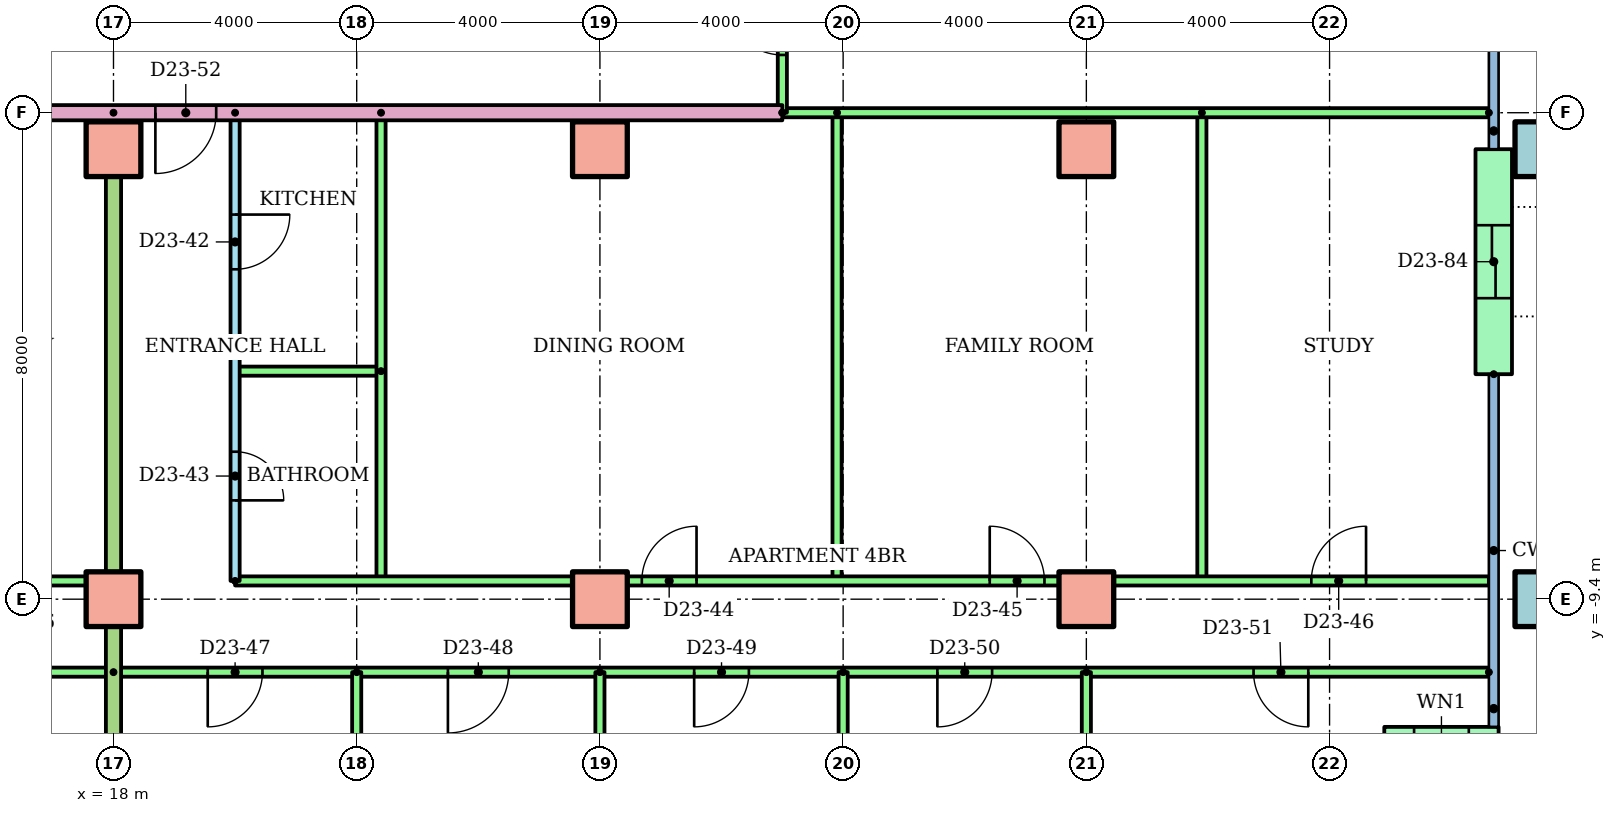
"""IFC4 building model, lengths in metres.
Left out: names, types, materials, properties, quantities, classifications, styles, units other than length and angle.
Written with IfcOpenShell. Run it as: python <this file> out.ifc"""

import sys

from ifc_helpers import new_model, si_unit, direction, frame, frame_2d, origin, origin_2d, place, context, subcontext, project, spatial, rectangle, hollow_rectangle, extrude, element, fill, save


model = new_model("IFC4")
c1 = context("Model", 3, precision=1e-05, world=origin(), true_north=direction((0.0, 1.0)))
c2 = subcontext(c1, "Body", "Model", "MODEL_VIEW")
j1 = project(units=[si_unit("LENGTHUNIT", "METRE"), si_unit("PLANEANGLEUNIT", "RADIAN")], contexts=[c1])
p1 = place(None, origin())
s1 = spatial("IfcSite", under=j1, at=p1, CompositionType="ELEMENT")
p2 = place(p1, origin())
s2 = spatial("IfcBuilding", under=s1, at=p2, CompositionType="ELEMENT")
p3 = place(p2, frame((0.0, 0.0, 90.3)))
s3 = spatial("IfcBuildingStorey", under=s2, at=p3, CompositionType="ELEMENT", Elevation=90.3)
for number, where in (
    (1, (18.0, -9.4, 0.0)),
    (2, (26.0, -9.4, 0.0)),
    (3, (34.0, -9.4, 0.0)),
):
    element("IfcColumn", number, at=place(p3, frame(where)), inside=s3, PredefinedType="COLUMN", context=c2, shape_type="SweptSolid", body=[
        extrude(rectangle(XDim=0.9, YDim=0.9, at=origin_2d()), origin(), (0.0, 0.0, 1.0), 3.2),
    ])
p4 = place(p3, frame((41.5, -9.4, 0.0)))
e4 = element("IfcColumn", 4, at=p4, inside=s3, PredefinedType="COLUMN", context=c2, shape_type="SweptSolid", body=[
    extrude(hollow_rectangle(XDim=0.9, YDim=0.9, WallThickness=0.045, at=origin_2d()), origin(), (0.0, 0.0, 1.0), 3.2),
])
for number, where in (
    (5, (18.0, -2.0, 0.0)),
    (6, (26.0, -2.0, 0.0)),
    (7, (34.0, -2.0, 0.0)),
):
    element("IfcColumn", number, at=place(p3, frame(where)), inside=s3, PredefinedType="COLUMN", context=c2, shape_type="SweptSolid", body=[
        extrude(rectangle(XDim=0.9, YDim=0.9, at=origin_2d()), origin(), (0.0, 0.0, 1.0), 3.2),
    ])
p5 = place(p3, frame((41.5, -2.0, 0.0)))
e8 = element("IfcColumn", 8, at=p5, inside=s3, PredefinedType="COLUMN", context=c2, shape_type="SweptSolid", body=[
    extrude(hollow_rectangle(XDim=0.9, YDim=0.9, WallThickness=0.045, at=origin_2d()), origin(), (0.0, 0.0, 1.0), 3.2),
])
p6 = place(p3, frame((38.9, -11.8, 0.0)))
e9 = element("IfcWall", 9, at=p6, inside=s3, PredefinedType="STANDARD", context=c2, shape_type="SweptSolid", body=[
    extrude(rectangle(XDim=1.88, YDim=0.6, at=frame_2d((0.94, 0.0))), origin(), (0.0, 0.0, 1.0), 2.92),
])
p7 = place(p6, frame((0.49, 0.0, 0.9)))
e10 = element("IfcOpeningElement", 10, at=p7, cuts=e9, PredefinedType="OPENING", context=c2, shape_type="SweptSolid", body=[
    extrude(rectangle(XDim=0.9, YDim=1.5, at=frame_2d((0.45, 0.75))), frame((0.0, 0.31, 0.0), z_axis=(0.0, -1.0, 0.0), x_axis=(1.0, 0.0, 0.0)), (0.0, 0.0, 1.0), 0.62),
])
p8 = place(p3, frame((40.7, -5.7, 0.0), z_axis=(0.0, 0.0, 1.0), x_axis=(0.0, 1.0, 0.0)))
e11 = element("IfcWall", 11, at=p8, inside=s3, PredefinedType="STANDARD", context=c2, shape_type="SweptSolid", body=[
    extrude(rectangle(XDim=3.7, YDim=0.6, at=frame_2d((1.85, 0.0))), origin(), (0.0, 0.0, 1.0), 2.92),
])
p9 = place(p8, frame((1.25, 0.0, 0.0)))
e12 = element("IfcOpeningElement", 12, at=p9, cuts=e11, PredefinedType="OPENING", context=c2, shape_type="SweptSolid", body=[
    extrude(rectangle(XDim=1.2, YDim=2.1, at=frame_2d((0.6, 1.05))), frame((0.0, 0.31, 0.0), z_axis=(0.0, -1.0, 0.0), x_axis=(1.0, 0.0, 0.0)), (0.0, 0.0, 1.0), 0.62),
])
p10 = place(p3, frame((4.0, -9.1, 0.0)))
e13 = element("IfcWall", 13, at=p10, inside=s3, PredefinedType="PARTITIONING", context=c2, shape_type="SweptSolid", body=[
    extrude(rectangle(XDim=14.0, YDim=0.15, at=frame_2d((7.0, 0.0))), origin(), (0.0, 0.0, 1.0), 2.4),
])
p11 = place(p10, frame((4.325, 0.0, 0.0)))
e14 = element("IfcOpeningElement", 14, at=p11, cuts=e13, PredefinedType="OPENING", context=c2, shape_type="SweptSolid", body=[
    extrude(rectangle(XDim=0.9, YDim=2.1, at=frame_2d((0.45, 1.05))), frame((0.0, 0.085, 0.0), z_axis=(0.0, -1.0, 0.0), x_axis=(1.0, 0.0, 0.0)), (0.0, 0.0, 1.0), 0.17),
])
p12 = place(p10, frame((8.575, 0.0, 0.0)))
e15 = element("IfcOpeningElement", 15, at=p12, cuts=e13, PredefinedType="OPENING", context=c2, shape_type="SweptSolid", body=[
    extrude(rectangle(XDim=0.9, YDim=2.1, at=frame_2d((0.45, 1.05))), frame((0.0, 0.085, 0.0), z_axis=(0.0, -1.0, 0.0), x_axis=(1.0, 0.0, 0.0)), (0.0, 0.0, 1.0), 0.17),
])
p13 = place(p10, frame((12.0, 0.0, 0.0)))
e16 = element("IfcOpeningElement", 16, at=p13, cuts=e13, PredefinedType="OPENING", context=c2, shape_type="SweptSolid", body=[
    extrude(rectangle(XDim=0.9, YDim=2.1, at=frame_2d((0.45, 1.05))), frame((0.0, 0.085, 0.0), z_axis=(0.0, -1.0, 0.0), x_axis=(1.0, 0.0, 0.0)), (0.0, 0.0, 1.0), 0.17),
])
p14 = place(p3, frame((18.0, -10.6, 0.0), z_axis=(0.0, 0.0, 1.0), x_axis=(-1.0, 0.0, 0.0)))
e17 = element("IfcWall", 17, at=p14, inside=s3, PredefinedType="PARTITIONING", context=c2, shape_type="SweptSolid", body=[
    extrude(rectangle(XDim=16.0, YDim=0.15, at=frame_2d((8.0, 0.0))), origin(), (0.0, 0.0, 1.0), 2.4),
])
p15 = place(p14, frame((13.55, 0.0, 0.0)))
e18 = element("IfcOpeningElement", 18, at=p15, cuts=e17, PredefinedType="OPENING", context=c2, shape_type="SweptSolid", body=[
    extrude(rectangle(XDim=0.9, YDim=2.1, at=frame_2d((0.45, 1.05))), frame((0.0, 0.085, 0.0), z_axis=(0.0, -1.0, 0.0), x_axis=(1.0, 0.0, 0.0)), (0.0, 0.0, 1.0), 0.17),
])
p16 = place(p14, frame((9.55, 0.0, 0.0)))
e19 = element("IfcOpeningElement", 19, at=p16, cuts=e17, PredefinedType="OPENING", context=c2, shape_type="SweptSolid", body=[
    extrude(rectangle(XDim=0.9, YDim=2.1, at=frame_2d((0.45, 1.05))), frame((0.0, 0.085, 0.0), z_axis=(0.0, -1.0, 0.0), x_axis=(1.0, 0.0, 0.0)), (0.0, 0.0, 1.0), 0.17),
])
p17 = place(p14, frame((5.55, 0.0, 0.0)))
e20 = element("IfcOpeningElement", 20, at=p17, cuts=e17, PredefinedType="OPENING", context=c2, shape_type="SweptSolid", body=[
    extrude(rectangle(XDim=0.9, YDim=2.1, at=frame_2d((0.45, 1.05))), frame((0.0, 0.085, 0.0), z_axis=(0.0, -1.0, 0.0), x_axis=(1.0, 0.0, 0.0)), (0.0, 0.0, 1.0), 0.17),
])
p18 = place(p14, frame((1.5, 0.0, 0.0)))
e21 = element("IfcOpeningElement", 21, at=p18, cuts=e17, PredefinedType="OPENING", context=c2, shape_type="SweptSolid", body=[
    extrude(rectangle(XDim=1.0, YDim=2.1, at=frame_2d((0.5, 1.05))), frame((0.0, 0.085, 0.0), z_axis=(0.0, -1.0, 0.0), x_axis=(1.0, 0.0, 0.0)), (0.0, 0.0, 1.0), 0.17),
])
p19 = place(p3, frame((20.0, -1.4, 0.0), z_axis=(0.0, 0.0, 1.0), x_axis=(0.0, -1.0, 0.0)))
e22 = element("IfcWall", 22, at=p19, inside=s3, PredefinedType="PARTITIONING", context=c2, shape_type="SweptSolid", body=[
    extrude(rectangle(XDim=7.7, YDim=0.15, at=frame_2d((3.85, 0.0))), origin(), (0.0, 0.0, 1.0), 2.4),
])
p20 = place(p19, frame((1.675, 0.0, 0.0)))
e23 = element("IfcOpeningElement", 23, at=p20, cuts=e22, PredefinedType="OPENING", context=c2, shape_type="SweptSolid", body=[
    extrude(rectangle(XDim=0.9, YDim=2.1, at=frame_2d((0.45, 1.05))), frame((0.0, 0.085, 0.0), z_axis=(0.0, -1.0, 0.0), x_axis=(1.0, 0.0, 0.0)), (0.0, 0.0, 1.0), 0.17),
])
p21 = place(p19, frame((5.575, 0.0, 0.0)))
e24 = element("IfcOpeningElement", 24, at=p21, cuts=e22, PredefinedType="OPENING", context=c2, shape_type="SweptSolid", body=[
    extrude(rectangle(XDim=0.8, YDim=2.1, at=frame_2d((0.4, 1.05))), frame((0.0, 0.085, 0.0), z_axis=(0.0, -1.0, 0.0), x_axis=(1.0, 0.0, 0.0)), (0.0, 0.0, 1.0), 0.17),
])
p22 = place(p3, frame((22.4, -5.65, 0.0), z_axis=(0.0, 0.0, 1.0), x_axis=(-1.0, 0.0, 0.0)))
e25 = element("IfcWall", 25, at=p22, inside=s3, PredefinedType="PARTITIONING", context=c2, shape_type="SweptSolid", body=[
    extrude(rectangle(XDim=2.4, YDim=0.15, at=frame_2d((1.2, 0.0))), origin(), (0.0, 0.0, 1.0), 2.4),
])
for number, where, z_axis, x_axis in (
    (26, (22.4, -1.4, 0.0), (0.0, 0.0, 1.0), (0.0, -1.0, 0.0)),
    (27, (29.9, -1.4, 0.0), (0.0, 0.0, 1.0), (0.0, -1.0, 0.0)),
    (28, (35.9, -1.4, 0.0), (0.0, 0.0, 1.0), (0.0, -1.0, 0.0)),
):
    element("IfcWall", number, at=place(p3, frame(where, z_axis=z_axis, x_axis=x_axis)), inside=s3, PredefinedType="PARTITIONING", context=c2, shape_type="SweptSolid", body=[
        extrude(rectangle(XDim=7.7, YDim=0.15, at=frame_2d((3.85, 0.0))), origin(), (0.0, 0.0, 1.0), 2.4),
    ])
p23 = place(p3, frame((20.0, -9.1, 0.0)))
e29 = element("IfcWall", 29, at=p23, inside=s3, PredefinedType="PARTITIONING", context=c2, shape_type="SweptSolid", body=[
    extrude(rectangle(XDim=20.62, YDim=0.15, at=frame_2d((10.31, 0.0))), origin(), (0.0, 0.0, 1.0), 2.4),
])
p24 = place(p23, frame((6.689, 0.0, 0.0)))
e30 = element("IfcOpeningElement", 30, at=p24, cuts=e29, PredefinedType="OPENING", context=c2, shape_type="SweptSolid", body=[
    extrude(rectangle(XDim=0.9, YDim=2.1, at=frame_2d((0.45, 1.05))), frame((0.0, 0.085, 0.0), z_axis=(0.0, -1.0, 0.0), x_axis=(1.0, 0.0, 0.0)), (0.0, 0.0, 1.0), 0.17),
])
p25 = place(p23, frame((12.411, 0.0, 0.0)))
e31 = element("IfcOpeningElement", 31, at=p25, cuts=e29, PredefinedType="OPENING", context=c2, shape_type="SweptSolid", body=[
    extrude(rectangle(XDim=0.9, YDim=2.1, at=frame_2d((0.45, 1.05))), frame((0.0, 0.085, 0.0), z_axis=(0.0, -1.0, 0.0), x_axis=(1.0, 0.0, 0.0)), (0.0, 0.0, 1.0), 0.17),
])
p26 = place(p23, frame((17.7, 0.0, 0.0)))
e32 = element("IfcOpeningElement", 32, at=p26, cuts=e29, PredefinedType="OPENING", context=c2, shape_type="SweptSolid", body=[
    extrude(rectangle(XDim=0.9, YDim=2.1, at=frame_2d((0.45, 1.05))), frame((0.0, 0.085, 0.0), z_axis=(0.0, -1.0, 0.0), x_axis=(1.0, 0.0, 0.0)), (0.0, 0.0, 1.0), 0.17),
])
p27 = place(p3, frame((40.62, -10.6, 0.0), z_axis=(0.0, 0.0, 1.0), x_axis=(-1.0, 0.0, 0.0)))
e33 = element("IfcWall", 33, at=p27, inside=s3, PredefinedType="PARTITIONING", context=c2, shape_type="SweptSolid", body=[
    extrude(rectangle(XDim=22.62, YDim=0.15, at=frame_2d((11.31, 0.0))), origin(), (0.0, 0.0, 1.0), 2.4),
])
p28 = place(p27, frame((20.17, 0.0, 0.0)))
e34 = element("IfcOpeningElement", 34, at=p28, cuts=e33, PredefinedType="OPENING", context=c2, shape_type="SweptSolid", body=[
    extrude(rectangle(XDim=0.9, YDim=2.1, at=frame_2d((0.45, 1.05))), frame((0.0, 0.085, 0.0), z_axis=(0.0, -1.0, 0.0), x_axis=(1.0, 0.0, 0.0)), (0.0, 0.0, 1.0), 0.17),
])
p29 = place(p27, frame((16.12, 0.0, 0.0)))
e35 = element("IfcOpeningElement", 35, at=p29, cuts=e33, PredefinedType="OPENING", context=c2, shape_type="SweptSolid", body=[
    extrude(rectangle(XDim=1.0, YDim=2.1, at=frame_2d((0.5, 1.05))), frame((0.0, 0.085, 0.0), z_axis=(0.0, -1.0, 0.0), x_axis=(1.0, 0.0, 0.0)), (0.0, 0.0, 1.0), 0.17),
])
p30 = place(p27, frame((12.17, 0.0, 0.0)))
e36 = element("IfcOpeningElement", 36, at=p30, cuts=e33, PredefinedType="OPENING", context=c2, shape_type="SweptSolid", body=[
    extrude(rectangle(XDim=0.9, YDim=2.1, at=frame_2d((0.45, 1.05))), frame((0.0, 0.085, 0.0), z_axis=(0.0, -1.0, 0.0), x_axis=(1.0, 0.0, 0.0)), (0.0, 0.0, 1.0), 0.17),
])
p31 = place(p27, frame((8.17, 0.0, 0.0)))
e37 = element("IfcOpeningElement", 37, at=p31, cuts=e33, PredefinedType="OPENING", context=c2, shape_type="SweptSolid", body=[
    extrude(rectangle(XDim=0.9, YDim=2.1, at=frame_2d((0.45, 1.05))), frame((0.0, 0.085, 0.0), z_axis=(0.0, -1.0, 0.0), x_axis=(1.0, 0.0, 0.0)), (0.0, 0.0, 1.0), 0.17),
])
p32 = place(p27, frame((2.97, 0.0, 0.0)))
e38 = element("IfcOpeningElement", 38, at=p32, cuts=e33, PredefinedType="OPENING", context=c2, shape_type="SweptSolid", body=[
    extrude(rectangle(XDim=0.9, YDim=2.1, at=frame_2d((0.45, 1.05))), frame((0.0, 0.085, 0.0), z_axis=(0.0, -1.0, 0.0), x_axis=(1.0, 0.0, 0.0)), (0.0, 0.0, 1.0), 0.17),
])
p33 = place(p3, frame((22.0, -10.6, 0.0), z_axis=(0.0, 0.0, 1.0), x_axis=(0.0, -1.0, 0.0)))
e39 = element("IfcWall", 39, at=p33, inside=s3, PredefinedType="PARTITIONING", context=c2, shape_type="SweptSolid", body=[
    extrude(rectangle(XDim=5.621, YDim=0.15, at=frame_2d((2.811, 0.0))), origin(), (0.0, 0.0, 1.0), 2.4),
])
p34 = place(p3, frame((26.0, -10.6, 0.0), z_axis=(0.0, 0.0, 1.0), x_axis=(0.0, -1.0, 0.0)))
e40 = element("IfcWall", 40, at=p34, inside=s3, PredefinedType="PARTITIONING", context=c2, shape_type="SweptSolid", body=[
    extrude(rectangle(XDim=5.61, YDim=0.15, at=frame_2d((2.805, 0.0))), origin(), (0.0, 0.0, 1.0), 2.4),
])
p35 = place(p3, frame((30.0, -10.6, 0.0), z_axis=(0.0, 0.0, 1.0), x_axis=(0.0, -1.0, 0.0)))
e41 = element("IfcWall", 41, at=p35, inside=s3, PredefinedType="PARTITIONING", context=c2, shape_type="SweptSolid", body=[
    extrude(rectangle(XDim=5.621, YDim=0.15, at=frame_2d((2.811, 0.0))), origin(), (0.0, 0.0, 1.0), 2.4),
])
p36 = place(p3, frame((34.0, -10.6, 0.0), z_axis=(0.0, 0.0, 1.0), x_axis=(0.0, -1.0, 0.0)))
e42 = element("IfcWall", 42, at=p36, inside=s3, PredefinedType="PARTITIONING", context=c2, shape_type="SweptSolid", body=[
    extrude(rectangle(XDim=5.61, YDim=0.15, at=frame_2d((2.805, 0.0))), origin(), (0.0, 0.0, 1.0), 2.4),
])
p37 = place(p3, frame((18.0, -1.4, 0.0), z_axis=(0.0, 0.0, 1.0), x_axis=(0.0, -1.0, 0.0)))
e43 = element("IfcWall", 43, at=p37, inside=s3, PredefinedType="PARTITIONING", context=c2, shape_type="SweptSolid", body=[
    extrude(rectangle(XDim=14.81, YDim=0.25, at=frame_2d((7.405, 0.0))), origin(), (0.0, 0.0, 1.0), 2.4),
])
p38 = place(p3, frame((29.0, -1.4, 0.0), z_axis=(0.0, 0.0, 1.0), x_axis=(-1.0, 0.0, 0.0)))
e44 = element("IfcWall", 44, at=p38, inside=s3, PredefinedType="PARTITIONING", context=c2, shape_type="SweptSolid", body=[
    extrude(rectangle(XDim=15.0, YDim=0.25, at=frame_2d((7.5, 0.0))), origin(), (0.0, 0.0, 1.0), 2.4),
])
p39 = place(p38, frame((9.311, 0.0, 0.0)))
e45 = element("IfcOpeningElement", 45, at=p39, cuts=e44, PredefinedType="OPENING", context=c2, shape_type="SweptSolid", body=[
    extrude(rectangle(XDim=1.0, YDim=2.1, at=frame_2d((0.5, 1.05))), frame((0.0, 0.135, 0.0), z_axis=(0.0, -1.0, 0.0), x_axis=(1.0, 0.0, 0.0)), (0.0, 0.0, 1.0), 0.27),
])
p40 = place(p3, frame((40.62, -1.4, 0.0), z_axis=(0.0, 0.0, 1.0), x_axis=(-1.0, 0.0, 0.0)))
e46 = element("IfcWall", 46, at=p40, inside=s3, PredefinedType="PARTITIONING", context=c2, shape_type="SweptSolid", body=[
    extrude(rectangle(XDim=11.62, YDim=0.15, at=frame_2d((5.81, 0.0))), origin(), (0.0, 0.0, 1.0), 2.4),
])
p41 = place(p3, frame((29.0, -1.4, 0.0), z_axis=(0.0, 0.0, 1.0), x_axis=(0.0, 1.0, 0.0)))
e47 = element("IfcWall", 47, at=p41, inside=s3, PredefinedType="PARTITIONING", context=c2, shape_type="SweptSolid", body=[
    extrude(rectangle(XDim=2.8, YDim=0.15, at=frame_2d((1.4, 0.0))), origin(), (0.0, 0.0, 1.0), 2.4),
])
p42 = place(p41, frame((0.95, 0.0, 0.0)))
e48 = element("IfcOpeningElement", 48, at=p42, cuts=e47, PredefinedType="OPENING", context=c2, shape_type="SweptSolid", body=[
    extrude(rectangle(XDim=0.9, YDim=2.1, at=frame_2d((0.45, 1.05))), frame((0.0, 0.085, 0.0), z_axis=(0.0, -1.0, 0.0), x_axis=(1.0, 0.0, 0.0)), (0.0, 0.0, 1.0), 0.17),
])
p43 = place(p20, origin())
e49 = element("IfcDoor", 49, at=p43, inside=s3, OperationType="SINGLE_SWING_LEFT", PredefinedType="DOOR", context=c2, shape_type="SweptSolid", body=[
    extrude(rectangle(XDim=0.9, YDim=2.1, at=frame_2d((0.45, 1.05))), frame((0.0, 0.025, 0.0), z_axis=(0.0, -1.0, 0.0), x_axis=(1.0, 0.0, 0.0)), (0.0, 0.0, 1.0), 0.05),
])
fill(e23, e49)
p44 = place(p21, origin())
e50 = element("IfcDoor", 50, at=p44, inside=s3, OperationType="SINGLE_SWING_RIGHT", PredefinedType="DOOR", context=c2, shape_type="SweptSolid", body=[
    extrude(rectangle(XDim=0.8, YDim=2.1, at=frame_2d((0.4, 1.05))), frame((0.0, 0.025, 0.0), z_axis=(0.0, -1.0, 0.0), x_axis=(1.0, 0.0, 0.0)), (0.0, 0.0, 1.0), 0.05),
])
fill(e24, e50)
p45 = place(p24, origin())
e51 = element("IfcDoor", 51, at=p45, inside=s3, OperationType="SINGLE_SWING_RIGHT", PredefinedType="DOOR", context=c2, shape_type="SweptSolid", body=[
    extrude(rectangle(XDim=0.9, YDim=2.1, at=frame_2d((0.45, 1.05))), frame((0.0, 0.025, 0.0), z_axis=(0.0, -1.0, 0.0), x_axis=(1.0, 0.0, 0.0)), (0.0, 0.0, 1.0), 0.05),
])
fill(e30, e51)
p46 = place(p25, origin())
e52 = element("IfcDoor", 52, at=p46, inside=s3, OperationType="SINGLE_SWING_LEFT", PredefinedType="DOOR", context=c2, shape_type="SweptSolid", body=[
    extrude(rectangle(XDim=0.9, YDim=2.1, at=frame_2d((0.45, 1.05))), frame((0.0, 0.025, 0.0), z_axis=(0.0, -1.0, 0.0), x_axis=(1.0, 0.0, 0.0)), (0.0, 0.0, 1.0), 0.05),
])
fill(e31, e52)
p47 = place(p26, origin())
e53 = element("IfcDoor", 53, at=p47, inside=s3, OperationType="SINGLE_SWING_RIGHT", PredefinedType="DOOR", context=c2, shape_type="SweptSolid", body=[
    extrude(rectangle(XDim=0.9, YDim=2.1, at=frame_2d((0.45, 1.05))), frame((0.0, 0.025, 0.0), z_axis=(0.0, -1.0, 0.0), x_axis=(1.0, 0.0, 0.0)), (0.0, 0.0, 1.0), 0.05),
])
fill(e32, e53)
p48 = place(p28, origin())
e54 = element("IfcDoor", 54, at=p48, inside=s3, OperationType="SINGLE_SWING_RIGHT", PredefinedType="DOOR", context=c2, shape_type="SweptSolid", body=[
    extrude(rectangle(XDim=0.9, YDim=2.1, at=frame_2d((0.45, 1.05))), frame((0.0, 0.025, 0.0), z_axis=(0.0, -1.0, 0.0), x_axis=(1.0, 0.0, 0.0)), (0.0, 0.0, 1.0), 0.05),
])
fill(e34, e54)
p49 = place(p29, origin())
e55 = element("IfcDoor", 55, at=p49, inside=s3, OperationType="SINGLE_SWING_RIGHT", PredefinedType="DOOR", context=c2, shape_type="SweptSolid", body=[
    extrude(rectangle(XDim=1.0, YDim=2.1, at=frame_2d((0.5, 1.05))), frame((0.0, 0.025, 0.0), z_axis=(0.0, -1.0, 0.0), x_axis=(1.0, 0.0, 0.0)), (0.0, 0.0, 1.0), 0.05),
])
fill(e35, e55)
p50 = place(p30, origin())
e56 = element("IfcDoor", 56, at=p50, inside=s3, OperationType="SINGLE_SWING_RIGHT", PredefinedType="DOOR", context=c2, shape_type="SweptSolid", body=[
    extrude(rectangle(XDim=0.9, YDim=2.1, at=frame_2d((0.45, 1.05))), frame((0.0, 0.025, 0.0), z_axis=(0.0, -1.0, 0.0), x_axis=(1.0, 0.0, 0.0)), (0.0, 0.0, 1.0), 0.05),
])
fill(e36, e56)
p51 = place(p31, origin())
e57 = element("IfcDoor", 57, at=p51, inside=s3, OperationType="SINGLE_SWING_RIGHT", PredefinedType="DOOR", context=c2, shape_type="SweptSolid", body=[
    extrude(rectangle(XDim=0.9, YDim=2.1, at=frame_2d((0.45, 1.05))), frame((0.0, 0.025, 0.0), z_axis=(0.0, -1.0, 0.0), x_axis=(1.0, 0.0, 0.0)), (0.0, 0.0, 1.0), 0.05),
])
fill(e37, e57)
p52 = place(p32, origin())
e58 = element("IfcDoor", 58, at=p52, inside=s3, OperationType="SINGLE_SWING_LEFT", PredefinedType="DOOR", context=c2, shape_type="SweptSolid", body=[
    extrude(rectangle(XDim=0.9, YDim=2.1, at=frame_2d((0.45, 1.05))), frame((0.0, 0.025, 0.0), z_axis=(0.0, -1.0, 0.0), x_axis=(1.0, 0.0, 0.0)), (0.0, 0.0, 1.0), 0.05),
])
fill(e38, e58)
p53 = place(p39, origin())
e59 = element("IfcDoor", 59, at=p53, inside=s3, OperationType="SINGLE_SWING_RIGHT", PredefinedType="DOOR", context=c2, shape_type="SweptSolid", body=[
    extrude(rectangle(XDim=1.0, YDim=2.1, at=frame_2d((0.5, 1.05))), frame((0.0, 0.025, 0.0), z_axis=(0.0, -1.0, 0.0), x_axis=(1.0, 0.0, 0.0)), (0.0, 0.0, 1.0), 0.05),
])
fill(e45, e59)
p54 = place(p42, origin())
e60 = element("IfcDoor", 60, at=p54, inside=s3, OperationType="SINGLE_SWING_RIGHT", PredefinedType="DOOR", context=c2, shape_type="SweptSolid", body=[
    extrude(rectangle(XDim=0.9, YDim=2.1, at=frame_2d((0.45, 1.05))), frame((0.0, 0.025, 0.0), z_axis=(0.0, -1.0, 0.0), x_axis=(1.0, 0.0, 0.0)), (0.0, 0.0, 1.0), 0.05),
])
fill(e48, e60)
p55 = place(p9, origin())
e61 = element("IfcDoor", 61, at=p55, inside=s3, OperationType="SLIDING_TO_LEFT", PredefinedType="DOOR", context=c2, shape_type="SweptSolid", body=[
    extrude(rectangle(XDim=1.2, YDim=2.1, at=frame_2d((0.6, 1.05))), frame((0.0, 0.025, 0.0), z_axis=(0.0, -1.0, 0.0), x_axis=(1.0, 0.0, 0.0)), (0.0, 0.0, 1.0), 0.05),
])
fill(e12, e61)
save(model, sys.argv[1])
